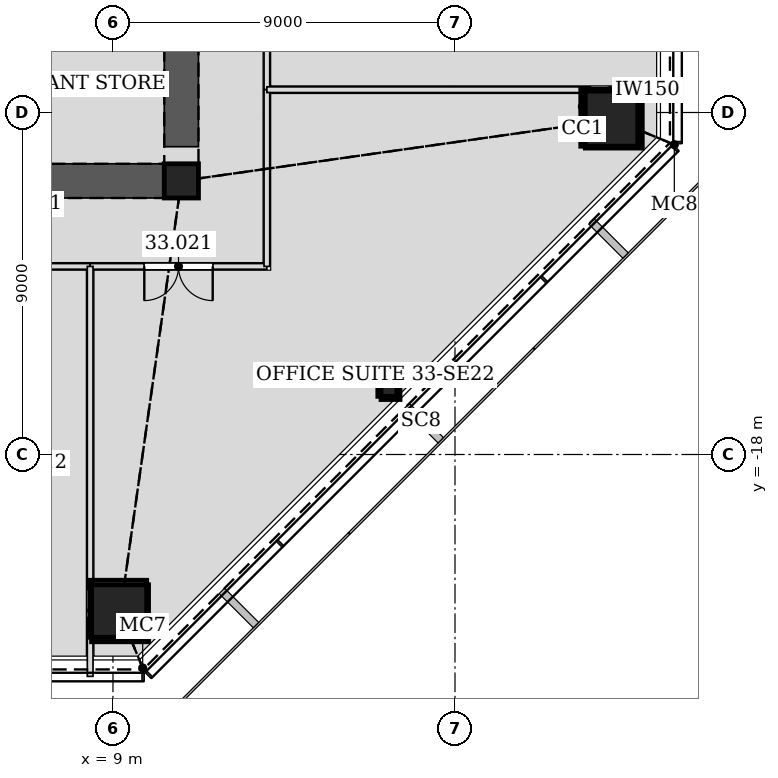
"""IFC4 building model, lengths in metres.
Left out: names, types, materials, properties, quantities, classifications, styles, units other than length and angle.
Written with IfcOpenShell. Run it as: python <this file> out.ifc"""

import sys

from ifc_helpers import new_model, si_unit, direction, frame, frame_2d, origin, origin_2d, place, context, subcontext, project, spatial, rectangle, hollow_rectangle, extrude, element, fill, save


model = new_model("IFC4")
c1 = context("Model", 3, precision=1e-05, world=origin(), true_north=direction((0.0, 1.0)))
c2 = subcontext(c1, "Body", "Model", "MODEL_VIEW")
j1 = project(units=[si_unit("LENGTHUNIT", "METRE"), si_unit("PLANEANGLEUNIT", "RADIAN")], contexts=[c1])
p1 = place(None, origin())
s1 = spatial("IfcSite", under=j1, at=p1, CompositionType="ELEMENT")
p2 = place(p1, origin())
s2 = spatial("IfcBuilding", under=s1, at=p2, CompositionType="ELEMENT")
p3 = place(p2, frame((0.0, 0.0, 147.0)))
s3 = spatial("IfcBuildingStorey", under=s2, at=p3, CompositionType="ELEMENT", Elevation=147.0)
for number, where, z_axis, x_axis in (
    (1, (9.187, -22.178, 0.0), (-0.012, 0.028, 1.0), (-0.923, -0.384, 0.0)),
    (2, (22.178, -9.187, 0.0), (-0.028, 0.012, 1.0), (-0.384, -0.923, 0.0)),
):
    element("IfcColumn", number, at=place(p3, frame(where, z_axis=z_axis, x_axis=x_axis)), inside=s3, PredefinedType="COLUMN", context=c2, shape_type="SweptSolid", body=[
        extrude(hollow_rectangle(XDim=1.5, YDim=1.5, WallThickness=0.07, at=origin_2d()), origin(), (0.0, 0.0, 1.0), 4.202),
    ])
p4 = place(p3, frame((16.303, -16.303, 0.0), z_axis=(-0.019988521213, 0.019988521213, 0.999600379171), x_axis=(-0.707106781187, -0.707106781187, 0.0)))
e3 = element("IfcColumn", 3, at=p4, inside=s3, PredefinedType="COLUMN", context=c2, shape_type="SweptSolid", body=[
    extrude(hollow_rectangle(XDim=0.5, YDim=0.5, WallThickness=0.025, at=origin_2d()), origin(), (0.0, 0.0, 1.0), 4.202),
])
p5 = place(p3, frame((10.8, -10.8, 0.0), z_axis=(0.0, 0.0, 1.0), x_axis=(1.0, 0.0, 0.0)))
e4 = element("IfcColumn", 4, at=p5, inside=s3, PredefinedType="COLUMN", context=c2, shape_type="SweptSolid", body=[
    extrude(hollow_rectangle(XDim=0.9, YDim=0.9, WallThickness=0.06, at=origin_2d()), origin(), (0.0, 0.0, 1.0), 4.2),
])
p6 = place(p3, frame((-10.8, -10.8, 0.0), z_axis=(0.0, 0.0, 1.0), x_axis=(1.0, 0.0, 0.0)))
e5 = element("IfcWall", 5, at=p6, inside=s3, PredefinedType="SOLIDWALL", context=c2, shape_type="SweptSolid", body=[
    extrude(rectangle(XDim=21.6, YDim=0.9, at=frame_2d((10.8, 0.0))), origin(), (0.0, 0.0, 1.0), 4.2),
])
p7 = place(p6, frame((10.05, 0.0, 0.0)))
e6 = element("IfcOpeningElement", 6, at=p7, cuts=e5, PredefinedType="OPENING", context=c2, shape_type="SweptSolid", body=[
    extrude(rectangle(XDim=1.5, YDim=2.1, at=frame_2d((0.75, 1.05))), frame((0.0, 0.46, 0.0), z_axis=(0.0, -1.0, 0.0), x_axis=(1.0, 0.0, 0.0)), (0.0, 0.0, 1.0), 0.92),
])
p8 = place(p6, frame((17.1, 0.0, 0.0)))
e7 = element("IfcOpeningElement", 7, at=p8, cuts=e5, PredefinedType="OPENING", context=c2, shape_type="SweptSolid", body=[
    extrude(rectangle(XDim=0.9, YDim=2.1, at=frame_2d((0.45, 1.05))), frame((0.0, 0.46, 0.0), z_axis=(0.0, -1.0, 0.0), x_axis=(1.0, 0.0, 0.0)), (0.0, 0.0, 1.0), 0.92),
])
p9 = place(p3, frame((10.8, -10.8, 0.0), z_axis=(0.0, 0.0, 1.0), x_axis=(0.0, 1.0, 0.0)))
e8 = element("IfcWall", 8, at=p9, inside=s3, PredefinedType="SOLIDWALL", context=c2, shape_type="SweptSolid", body=[
    extrude(rectangle(XDim=21.6, YDim=0.9, at=frame_2d((10.8, 0.0))), origin(), (0.0, 0.0, 1.0), 4.2),
])
p10 = place(p9, frame((11.7, 0.0, 0.0)))
e9 = element("IfcOpeningElement", 9, at=p10, cuts=e8, PredefinedType="OPENING", context=c2, shape_type="SweptSolid", body=[
    extrude(rectangle(XDim=1.2, YDim=2.1, at=frame_2d((0.6, 1.05))), frame((0.0, 0.46, 0.0), z_axis=(0.0, -1.0, 0.0), x_axis=(1.0, 0.0, 0.0)), (0.0, 0.0, 1.0), 0.92),
])
p11 = place(p9, frame((8.7, 0.0, 0.0)))
e10 = element("IfcOpeningElement", 10, at=p11, cuts=e8, PredefinedType="OPENING", context=c2, shape_type="SweptSolid", body=[
    extrude(rectangle(XDim=1.2, YDim=2.1, at=frame_2d((0.6, 1.05))), frame((0.0, 0.46, 0.0), z_axis=(0.0, -1.0, 0.0), x_axis=(1.0, 0.0, 0.0)), (0.0, 0.0, 1.0), 0.92),
])
p12 = place(p3, frame((0.9, -13.05, 0.0), z_axis=(0.0, 0.0, 1.0), x_axis=(1.0, 0.0, 0.0)))
e11 = element("IfcWall", 11, at=p12, inside=s3, PredefinedType="PARTITIONING", context=c2, shape_type="SweptSolid", body=[
    extrude(rectangle(XDim=7.501, YDim=0.15, at=frame_2d((3.75, 0.0))), origin(), (0.0, 0.0, 1.0), 4.035),
])
p13 = place(p12, frame((2.851, 0.0, 0.0)))
e12 = element("IfcOpeningElement", 12, at=p13, cuts=e11, PredefinedType="OPENING", context=c2, shape_type="SweptSolid", body=[
    extrude(rectangle(XDim=1.8, YDim=2.4, at=frame_2d((0.9, 1.2))), frame((0.0, 0.085, 0.0), z_axis=(0.0, -1.0, 0.0), x_axis=(1.0, 0.0, 0.0)), (0.0, 0.0, 1.0), 0.17),
])
p14 = place(p3, frame((13.05, -8.401, 0.0), z_axis=(0.0, 0.0, 1.0), x_axis=(0.0, 1.0, 0.0)))
e13 = element("IfcWall", 13, at=p14, inside=s3, PredefinedType="PARTITIONING", context=c2, shape_type="SweptSolid", body=[
    extrude(rectangle(XDim=7.501, YDim=0.15, at=frame_2d((3.75, 0.0))), origin(), (0.0, 0.0, 1.0), 4.035),
])
p15 = place(p3, frame((8.399, -13.05, 0.0), z_axis=(0.0, 0.0, 1.0), x_axis=(1.0, 0.0, 0.0)))
e14 = element("IfcWall", 14, at=p15, inside=s3, PredefinedType="PARTITIONING", context=c2, shape_type="SweptSolid", body=[
    extrude(rectangle(XDim=4.651, YDim=0.15, at=frame_2d((2.326, 0.0))), origin(), (0.0, 0.0, 1.0), 3.098),
])
p16 = place(p15, frame((1.426, 0.0, 0.0)))
e15 = element("IfcOpeningElement", 15, at=p16, cuts=e14, PredefinedType="OPENING", context=c2, shape_type="SweptSolid", body=[
    extrude(rectangle(XDim=1.8, YDim=2.4, at=frame_2d((0.9, 1.2))), frame((0.0, 0.085, 0.0), z_axis=(0.0, -1.0, 0.0), x_axis=(1.0, 0.0, 0.0)), (0.0, 0.0, 1.0), 0.17),
])
p17 = place(p3, frame((13.05, -13.05, 0.0), z_axis=(0.0, 0.0, 1.0), x_axis=(0.0, 1.0, 0.0)))
e16 = element("IfcWall", 16, at=p17, inside=s3, PredefinedType="PARTITIONING", context=c2, shape_type="SweptSolid", body=[
    extrude(rectangle(XDim=4.651, YDim=0.15, at=frame_2d((2.326, 0.0))), origin(), (0.0, 0.0, 1.0), 3.098),
])
p18 = place(p3, frame((8.4, -23.838, 0.0), z_axis=(0.0, 0.0, 1.0), x_axis=(0.0, 1.0, 0.0)))
e17 = element("IfcWall", 17, at=p18, inside=s3, PredefinedType="PARTITIONING", context=c2, shape_type="SweptSolid", body=[
    extrude(rectangle(XDim=1.55, YDim=0.15, at=frame_2d((0.775, 0.0))), origin(), (0.0, 0.0, 1.0), 4.035),
])
for number, where, z_axis, x_axis in (
    (18, (8.4, -21.532, 0.0), (0.0, 0.0, 1.0), (0.0, 1.0, 0.0)),
    (19, (13.05, -8.4, 0.0), (0.0, 0.0, 1.0), (1.0, 0.0, 0.0)),
):
    element("IfcWall", number, at=place(p3, frame(where, z_axis=z_axis, x_axis=x_axis)), inside=s3, PredefinedType="PARTITIONING", context=c2, shape_type="SweptSolid", body=[
        extrude(rectangle(XDim=8.482, YDim=0.15, at=frame_2d((4.241, 0.0))), origin(), (0.0, 0.0, 1.0), 3.426),
    ])
p19 = place(p3, frame((22.289, -8.4, 0.0), z_axis=(0.0, 0.0, 1.0), x_axis=(1.0, 0.0, 0.0)))
e20 = element("IfcWall", 20, at=p19, inside=s3, PredefinedType="PARTITIONING", context=c2, shape_type="SweptSolid", body=[
    extrude(rectangle(XDim=1.55, YDim=0.15, at=frame_2d((0.775, 0.0))), origin(), (0.0, 0.0, 1.0), 4.035),
])
p20 = place(p16, frame((1.8, 0.0, 0.0), z_axis=(0.0, 0.0, 1.0), x_axis=(-1.0, 0.0, 0.0)))
e21 = element("IfcDoor", 21, at=p20, inside=s3, OperationType="DOUBLE_DOOR_SINGLE_SWING", PredefinedType="DOOR", context=c2, shape_type="SweptSolid", body=[
    extrude(rectangle(XDim=1.8, YDim=2.4, at=frame_2d((0.9, 1.2))), frame((0.0, 0.025, 0.0), z_axis=(0.0, -1.0, 0.0), x_axis=(1.0, 0.0, 0.0)), (0.0, 0.0, 1.0), 0.05),
])
fill(e15, e21)
save(model, sys.argv[1])
